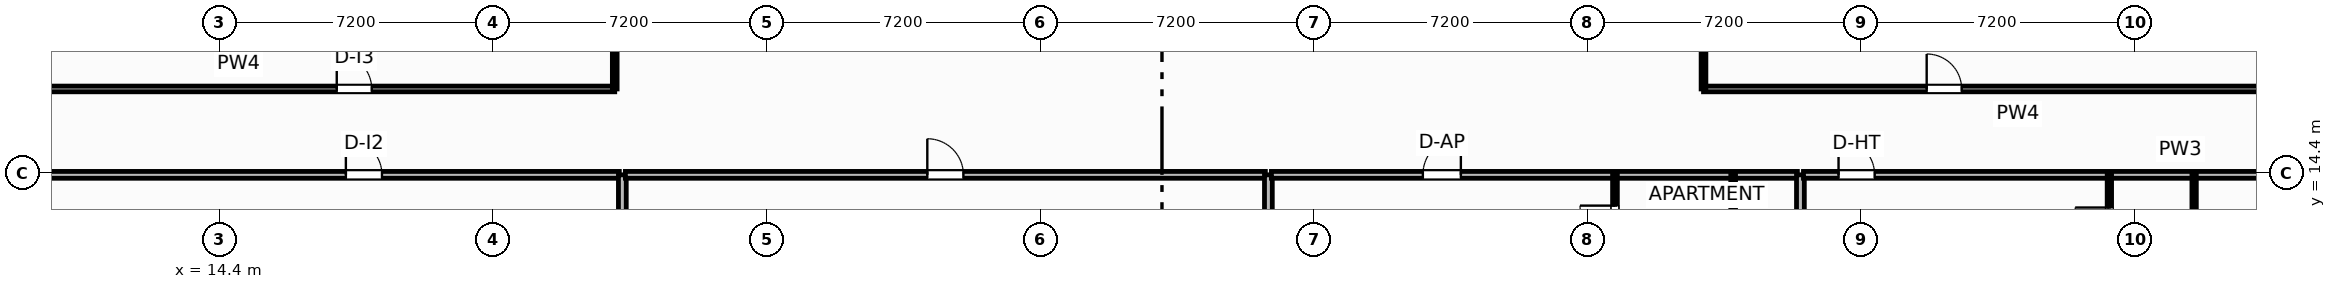
"""IFC4 building model, lengths in metres.
Left out: names, types, materials, properties, quantities, classifications, styles, units other than length and angle.
Written with IfcOpenShell. Run it as: python <this file> out.ifc"""

import sys

from ifc_helpers import new_model, si_unit, direction, frame, frame_2d, origin, place, context, subcontext, project, spatial, rectangle, extrude, element, fill, save


model = new_model("IFC4")
c1 = context("Model", 3, precision=1e-05, world=origin(), true_north=direction((0.0, 1.0)))
c2 = subcontext(c1, "Body", "Model", "MODEL_VIEW")
j1 = project(units=[si_unit("LENGTHUNIT", "METRE"), si_unit("PLANEANGLEUNIT", "RADIAN")], contexts=[c1])
p1 = place(None, origin())
s1 = spatial("IfcSite", under=j1, at=p1, CompositionType="ELEMENT")
p2 = place(p1, origin())
s2 = spatial("IfcBuilding", under=s1, at=p2, CompositionType="ELEMENT")
p3 = place(p2, frame((0.0, 0.0, 185.7)))
s3 = spatial("IfcBuildingStorey", under=s2, at=p3, CompositionType="ELEMENT", Elevation=185.7)
p4 = place(p3, frame((5.0, 16.61, 0.0), z_axis=(0.0, 0.0, 1.0), x_axis=(1.0, 0.0, 0.0)))
e1 = element("IfcWall", 1, at=p4, inside=s3, PredefinedType="PARTITIONING", context=c2, shape_type="SweptSolid", body=[
    extrude(rectangle(XDim=19.8, YDim=0.15, at=frame_2d((9.9, 0.0))), origin(), (0.0, 0.0, 1.0), 3.45),
])
p5 = place(p4, frame((12.485, 0.0, 0.0)))
e2 = element("IfcOpeningElement", 2, at=p5, cuts=e1, PredefinedType="OPENING", context=c2, shape_type="SweptSolid", body=[
    extrude(rectangle(XDim=0.92, YDim=2.05, at=frame_2d((0.46, 1.025))), frame((0.0, 0.085, 0.0), z_axis=(0.0, -1.0, 0.0), x_axis=(1.0, 0.0, 0.0)), (0.0, 0.0, 1.0), 0.17),
])
p6 = place(p3, frame((24.8, 16.61, 0.0), z_axis=(0.0, 0.0, 1.0), x_axis=(0.0, 1.0, 0.0)))
e3 = element("IfcWall", 3, at=p6, inside=s3, PredefinedType="PARTITIONING", context=c2, shape_type="SweptSolid", body=[
    extrude(rectangle(XDim=2.63, YDim=0.125, at=frame_2d((1.315, 0.0))), origin(), (0.0, 0.0, 1.0), 3.45),
])
p7 = place(p3, frame((53.45, 16.61, 0.0), z_axis=(0.0, 0.0, 1.0), x_axis=(1.0, 0.0, 0.0)))
e4 = element("IfcWall", 4, at=p7, inside=s3, PredefinedType="PARTITIONING", context=c2, shape_type="SweptSolid", body=[
    extrude(rectangle(XDim=16.55, YDim=0.15, at=frame_2d((8.275, 0.0))), origin(), (0.0, 0.0, 1.0), 3.45),
])
p8 = place(p7, frame((5.873, 0.0, 0.0)))
e5 = element("IfcOpeningElement", 5, at=p8, cuts=e4, PredefinedType="OPENING", context=c2, shape_type="SweptSolid", body=[
    extrude(rectangle(XDim=0.92, YDim=2.05, at=frame_2d((0.46, 1.025))), frame((0.0, 0.085, 0.0), z_axis=(0.0, -1.0, 0.0), x_axis=(1.0, 0.0, 0.0)), (0.0, 0.0, 1.0), 0.17),
])
p9 = place(p3, frame((53.45, 16.61, 0.0), z_axis=(0.0, 0.0, 1.0), x_axis=(0.0, 1.0, 0.0)))
e6 = element("IfcWall", 6, at=p9, inside=s3, PredefinedType="PARTITIONING", context=c2, shape_type="SweptSolid", body=[
    extrude(rectangle(XDim=2.63, YDim=0.125, at=frame_2d((1.315, 0.0))), origin(), (0.0, 0.0, 1.0), 2.662),
])
p10 = place(p3, frame((5.15, 14.35, 0.0), z_axis=(0.0, 0.0, 1.0), x_axis=(1.0, 0.0, 0.0)))
e7 = element("IfcWall", 7, at=p10, inside=s3, PredefinedType="PARTITIONING", context=c2, shape_type="SweptSolid", body=[
    extrude(rectangle(XDim=19.77, YDim=0.18, at=frame_2d((9.885, 0.0))), origin(), (0.0, 0.0, 1.0), 3.45),
])
p11 = place(p10, frame((12.575, 0.0, 0.0)))
e8 = element("IfcOpeningElement", 8, at=p11, cuts=e7, PredefinedType="OPENING", context=c2, shape_type="SweptSolid", body=[
    extrude(rectangle(XDim=0.95, YDim=2.05, at=frame_2d((0.475, 1.025))), frame((0.0, 0.1, 0.0), z_axis=(0.0, -1.0, 0.0), x_axis=(1.0, 0.0, 0.0)), (0.0, 0.0, 1.0), 0.2),
])
p12 = place(p3, frame((25.0, 3.775, 0.0), z_axis=(0.0, 0.0, 1.0), x_axis=(0.0, 1.0, 0.0)))
e9 = element("IfcWall", 9, at=p12, inside=s3, PredefinedType="PARTITIONING", context=c2, shape_type="SweptSolid", body=[
    extrude(rectangle(XDim=10.575, YDim=0.205, at=frame_2d((5.288, 0.0))), origin(), (0.0, 0.0, 1.0), 3.45),
])
p13 = place(p3, frame((25.08, 14.35, 0.0), z_axis=(0.0, 0.0, 1.0), x_axis=(1.0, 0.0, 0.0)))
e10 = element("IfcWall", 10, at=p13, inside=s3, PredefinedType="PARTITIONING", context=c2, shape_type="SweptSolid", body=[
    extrude(rectangle(XDim=16.84, YDim=0.18, at=frame_2d((8.42, 0.0))), origin(), (0.0, 0.0, 1.0), 3.45),
])
p14 = place(p13, frame((7.945, 0.0, 0.0)))
e11 = element("IfcOpeningElement", 11, at=p14, cuts=e10, PredefinedType="OPENING", context=c2, shape_type="SweptSolid", body=[
    extrude(rectangle(XDim=0.95, YDim=2.05, at=frame_2d((0.475, 1.025))), frame((0.0, 0.1, 0.0), z_axis=(0.0, -1.0, 0.0), x_axis=(1.0, 0.0, 0.0)), (0.0, 0.0, 1.0), 0.2),
])
p15 = place(p3, frame((42.0, 5.835, 0.0), z_axis=(0.0, 0.0, 1.0), x_axis=(0.0, 1.0, 0.0)))
e12 = element("IfcWall", 12, at=p15, inside=s3, PredefinedType="PARTITIONING", context=c2, shape_type="SweptSolid", body=[
    extrude(rectangle(XDim=8.515, YDim=0.205, at=frame_2d((4.257, 0.0))), origin(), (0.0, 0.0, 1.0), 2.662),
])
p16 = place(p3, frame((42.08, 14.35, 0.0), z_axis=(0.0, 0.0, 1.0), x_axis=(1.0, 0.0, 0.0)))
e13 = element("IfcWall", 13, at=p16, inside=s3, PredefinedType="PARTITIONING", context=c2, shape_type="SweptSolid", body=[
    extrude(rectangle(XDim=13.84, YDim=0.18, at=frame_2d((6.92, 0.0))), origin(), (0.0, 0.0, 1.0), 3.45),
])
p17 = place(p16, frame((3.985, 0.0, 0.0)))
e14 = element("IfcOpeningElement", 14, at=p17, cuts=e13, PredefinedType="OPENING", context=c2, shape_type="SweptSolid", body=[
    extrude(rectangle(XDim=1.0, YDim=2.2, at=frame_2d((0.5, 1.1))), frame((0.0, 0.1, 0.0), z_axis=(0.0, -1.0, 0.0), x_axis=(1.0, 0.0, 0.0)), (0.0, 0.0, 1.0), 0.2),
])
p18 = place(p3, frame((51.12, 4.826, 0.0), z_axis=(0.0, 0.0, 1.0), x_axis=(0.0, 1.0, 0.0)))
e15 = element("IfcWall", 15, at=p18, inside=s3, PredefinedType="PARTITIONING", context=c2, shape_type="SweptSolid", body=[
    extrude(rectangle(XDim=9.524, YDim=0.125, at=frame_2d((4.762, 0.0))), origin(), (0.0, 0.0, 1.0), 2.662),
])
p19 = place(p18, frame((0.725, 0.0, 0.0)))
e16 = element("IfcOpeningElement", 16, at=p19, cuts=e15, PredefinedType="OPENING", context=c2, shape_type="SweptSolid", body=[
    extrude(rectangle(XDim=0.92, YDim=2.05, at=frame_2d((0.46, 1.025))), frame((0.0, 0.073, 0.0), z_axis=(0.0, -1.0, 0.0), x_axis=(1.0, 0.0, 0.0)), (0.0, 0.0, 1.0), 0.145),
])
p20 = place(p18, frame((5.502, 0.0, 0.0)))
e17 = element("IfcOpeningElement", 17, at=p20, cuts=e15, PredefinedType="OPENING", context=c2, shape_type="SweptSolid", body=[
    extrude(rectangle(XDim=0.9, YDim=2.05, at=frame_2d((0.45, 1.025))), frame((0.0, 0.073, 0.0), z_axis=(0.0, -1.0, 0.0), x_axis=(1.0, 0.0, 0.0)), (0.0, 0.0, 1.0), 0.145),
])
p21 = place(p18, frame((7.794, 0.0, 0.0)))
e18 = element("IfcOpeningElement", 18, at=p21, cuts=e15, PredefinedType="OPENING", context=c2, shape_type="SweptSolid", body=[
    extrude(rectangle(XDim=0.92, YDim=2.05, at=frame_2d((0.46, 1.025))), frame((0.0, 0.073, 0.0), z_axis=(0.0, -1.0, 0.0), x_axis=(1.0, 0.0, 0.0)), (0.0, 0.0, 1.0), 0.145),
])
p22 = place(p3, frame((54.23, 11.94, 0.0), z_axis=(0.0, 0.0, 1.0), x_axis=(0.0, 1.0, 0.0)))
e19 = element("IfcWall", 19, at=p22, inside=s3, PredefinedType="PARTITIONING", context=c2, shape_type="SweptSolid", body=[
    extrude(rectangle(XDim=2.41, YDim=0.125, at=frame_2d((1.205, 0.0))), origin(), (0.0, 0.0, 1.0), 3.45),
])
p23 = place(p3, frame((56.0, 7.533, 0.0), z_axis=(0.0, 0.0, 1.0), x_axis=(0.0, 1.0, 0.0)))
e20 = element("IfcWall", 20, at=p23, inside=s3, PredefinedType="PARTITIONING", context=c2, shape_type="SweptSolid", body=[
    extrude(rectangle(XDim=6.817, YDim=0.205, at=frame_2d((3.409, 0.0))), origin(), (0.0, 0.0, 1.0), 3.45),
])
p24 = place(p3, frame((56.08, 14.35, 0.0), z_axis=(0.0, 0.0, 1.0), x_axis=(1.0, 0.0, 0.0)))
e21 = element("IfcWall", 21, at=p24, inside=s3, PredefinedType="PARTITIONING", context=c2, shape_type="SweptSolid", body=[
    extrude(rectangle(XDim=19.825, YDim=0.18, at=frame_2d((9.912, 0.0))), origin(), (0.0, 0.0, 1.0), 3.45),
])
p25 = place(p24, frame((0.923, 0.0, 0.0)))
e22 = element("IfcOpeningElement", 22, at=p25, cuts=e21, PredefinedType="OPENING", context=c2, shape_type="SweptSolid", body=[
    extrude(rectangle(XDim=0.95, YDim=2.15, at=frame_2d((0.475, 1.075))), frame((0.0, 0.1, 0.0), z_axis=(0.0, -1.0, 0.0), x_axis=(1.0, 0.0, 0.0)), (0.0, 0.0, 1.0), 0.2),
])
p26 = place(p3, frame((64.13, 11.83, 0.0), z_axis=(0.0, 0.0, 1.0), x_axis=(0.0, 1.0, 0.0)))
e23 = element("IfcWall", 23, at=p26, inside=s3, PredefinedType="PARTITIONING", context=c2, shape_type="SweptSolid", body=[
    extrude(rectangle(XDim=2.52, YDim=0.115, at=frame_2d((1.26, 0.0))), origin(), (0.0, 0.0, 1.0), 3.45),
])
p27 = place(p26, frame((0.76, 0.0, 0.0)))
e24 = element("IfcOpeningElement", 24, at=p27, cuts=e23, PredefinedType="OPENING", context=c2, shape_type="SweptSolid", body=[
    extrude(rectangle(XDim=0.9, YDim=2.05, at=frame_2d((0.45, 1.025))), frame((0.0, 0.067, 0.0), z_axis=(0.0, -1.0, 0.0), x_axis=(1.0, 0.0, 0.0)), (0.0, 0.0, 1.0), 0.135),
])
p28 = place(p3, frame((66.36, 11.83, 0.0), z_axis=(0.0, 0.0, 1.0), x_axis=(0.0, 1.0, 0.0)))
e25 = element("IfcWall", 25, at=p28, inside=s3, PredefinedType="PARTITIONING", context=c2, shape_type="SweptSolid", body=[
    extrude(rectangle(XDim=2.52, YDim=0.115, at=frame_2d((1.26, 0.0))), origin(), (0.0, 0.0, 1.0), 3.45),
])
p29 = place(p5, origin())
e26 = element("IfcDoor", 26, at=p29, inside=s3, OperationType="SINGLE_SWING_LEFT", PredefinedType="DOOR", context=c2, shape_type="SweptSolid", body=[
    extrude(rectangle(XDim=0.92, YDim=2.05, at=frame_2d((0.46, 1.025))), frame((0.0, 0.025, 0.0), z_axis=(0.0, -1.0, 0.0), x_axis=(1.0, 0.0, 0.0)), (0.0, 0.0, 1.0), 0.05),
])
fill(e2, e26)
p30 = place(p8, origin())
e27 = element("IfcDoor", 27, at=p30, inside=s3, OperationType="SINGLE_SWING_LEFT", PredefinedType="DOOR", context=c2, shape_type="SweptSolid", body=[
    extrude(rectangle(XDim=0.92, YDim=2.05, at=frame_2d((0.46, 1.025))), frame((0.0, 0.025, 0.0), z_axis=(0.0, -1.0, 0.0), x_axis=(1.0, 0.0, 0.0)), (0.0, 0.0, 1.0), 0.05),
])
fill(e5, e27)
p31 = place(p11, origin())
e28 = element("IfcDoor", 28, at=p31, inside=s3, OperationType="SINGLE_SWING_LEFT", PredefinedType="DOOR", context=c2, shape_type="SweptSolid", body=[
    extrude(rectangle(XDim=0.95, YDim=2.05, at=frame_2d((0.475, 1.025))), frame((0.0, 0.025, 0.0), z_axis=(0.0, -1.0, 0.0), x_axis=(1.0, 0.0, 0.0)), (0.0, 0.0, 1.0), 0.05),
])
fill(e8, e28)
p32 = place(p14, origin())
e29 = element("IfcDoor", 29, at=p32, inside=s3, OperationType="SINGLE_SWING_LEFT", PredefinedType="DOOR", context=c2, shape_type="SweptSolid", body=[
    extrude(rectangle(XDim=0.95, YDim=2.05, at=frame_2d((0.475, 1.025))), frame((0.0, 0.025, 0.0), z_axis=(0.0, -1.0, 0.0), x_axis=(1.0, 0.0, 0.0)), (0.0, 0.0, 1.0), 0.05),
])
fill(e11, e29)
p33 = place(p17, origin())
e30 = element("IfcDoor", 30, at=p33, inside=s3, OperationType="SINGLE_SWING_RIGHT", PredefinedType="DOOR", context=c2, shape_type="SweptSolid", body=[
    extrude(rectangle(XDim=1.0, YDim=2.2, at=frame_2d((0.5, 1.1))), frame((0.0, 0.025, 0.0), z_axis=(0.0, -1.0, 0.0), x_axis=(1.0, 0.0, 0.0)), (0.0, 0.0, 1.0), 0.05),
])
fill(e14, e30)
p34 = place(p21, origin())
e31 = element("IfcDoor", 31, at=p34, inside=s3, OperationType="SINGLE_SWING_RIGHT", PredefinedType="DOOR", context=c2, shape_type="SweptSolid", body=[
    extrude(rectangle(XDim=0.92, YDim=2.05, at=frame_2d((0.46, 1.025))), frame((0.0, 0.025, 0.0), z_axis=(0.0, -1.0, 0.0), x_axis=(1.0, 0.0, 0.0)), (0.0, 0.0, 1.0), 0.05),
])
fill(e18, e31)
p35 = place(p25, origin())
e32 = element("IfcDoor", 32, at=p35, inside=s3, OperationType="SINGLE_SWING_LEFT", PredefinedType="DOOR", context=c2, shape_type="SweptSolid", body=[
    extrude(rectangle(XDim=0.95, YDim=2.15, at=frame_2d((0.475, 1.075))), frame((0.0, 0.025, 0.0), z_axis=(0.0, -1.0, 0.0), x_axis=(1.0, 0.0, 0.0)), (0.0, 0.0, 1.0), 0.05),
])
fill(e22, e32)
p36 = place(p27, origin())
e33 = element("IfcDoor", 33, at=p36, inside=s3, OperationType="SINGLE_SWING_RIGHT", PredefinedType="DOOR", context=c2, shape_type="SweptSolid", body=[
    extrude(rectangle(XDim=0.9, YDim=2.05, at=frame_2d((0.45, 1.025))), frame((0.0, 0.025, 0.0), z_axis=(0.0, -1.0, 0.0), x_axis=(1.0, 0.0, 0.0)), (0.0, 0.0, 1.0), 0.05),
])
fill(e24, e33)
save(model, sys.argv[1])
